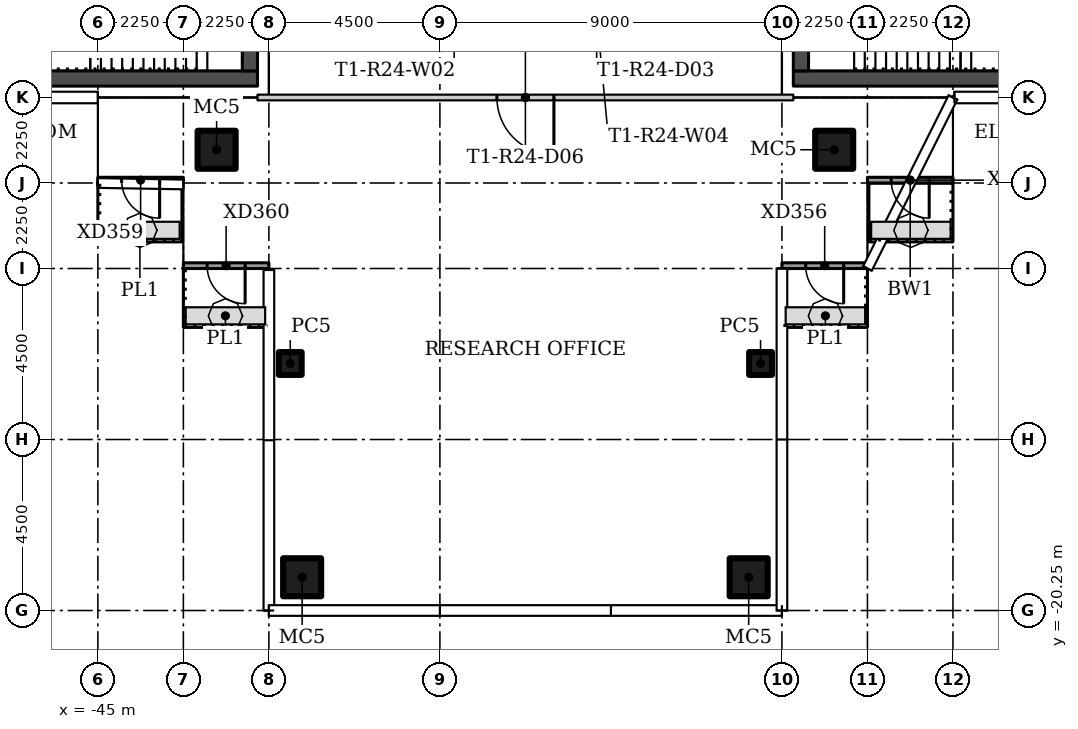
"""IFC4 building model, lengths in metres.
Left out: names, types, materials, properties, quantities, classifications, styles, units other than length and angle.
Written with IfcOpenShell. Run it as: python <this file> out.ifc"""

import sys

from ifc_helpers import new_model, si_unit, direction, frame, frame_2d, origin, origin_2d, place, context, subcontext, project, spatial, rectangle, hollow_rectangle, extrude, element, fill, save


model = new_model("IFC4")
c1 = context("Model", 3, precision=1e-05, world=origin(), true_north=direction((0.0, 1.0)))
c2 = subcontext(c1, "Body", "Model", "MODEL_VIEW")
j1 = project(units=[si_unit("LENGTHUNIT", "METRE"), si_unit("PLANEANGLEUNIT", "RADIAN")], contexts=[c1])
p1 = place(None, origin())
s1 = spatial("IfcSite", under=j1, at=p1, CompositionType="ELEMENT")
p2 = place(p1, origin())
s2 = spatial("IfcBuilding", under=s1, at=p2, CompositionType="ELEMENT")
p3 = place(p2, frame((0.0, 0.0, 221.7)))
s3 = spatial("IfcBuildingStorey", under=s2, at=p3, CompositionType="ELEMENT", Elevation=221.7)
for number, where in (
    (1, (-25.625, -8.125, 0.0)),
    (2, (-41.875, -8.125, 0.0)),
):
    element("IfcColumn", number, at=place(p3, frame(where)), inside=s3, PredefinedType="COLUMN", context=c2, shape_type="SweptSolid", body=[
        extrude(hollow_rectangle(XDim=1.0, YDim=1.0, WallThickness=0.04, at=origin_2d()), origin(), (0.0, 0.0, 1.0), 3.45),
    ])
p4 = place(p3, frame((-39.938, -13.75, 0.0)))
e3 = element("IfcColumn", 3, at=p4, inside=s3, PredefinedType="COLUMN", context=c2, shape_type="SweptSolid", body=[
    extrude(hollow_rectangle(XDim=0.6, YDim=0.6, WallThickness=0.02, at=origin_2d()), origin(), (0.0, 0.0, 1.0), 3.45),
])
p5 = place(p3, frame((-39.625, -19.375, 0.0)))
e4 = element("IfcColumn", 4, at=p5, inside=s3, PredefinedType="COLUMN", context=c2, shape_type="SweptSolid", body=[
    extrude(hollow_rectangle(XDim=1.0, YDim=1.0, WallThickness=0.04, at=origin_2d()), origin(), (0.0, 0.0, 1.0), 3.45),
])
p6 = place(p3, frame((-27.562, -13.75, 0.0)))
e5 = element("IfcColumn", 5, at=p6, inside=s3, PredefinedType="COLUMN", context=c2, shape_type="SweptSolid", body=[
    extrude(hollow_rectangle(XDim=0.6, YDim=0.6, WallThickness=0.02, at=origin_2d()), origin(), (0.0, 0.0, 1.0), 3.45),
])
p7 = place(p3, frame((-27.875, -19.375, 0.0)))
e6 = element("IfcColumn", 6, at=p7, inside=s3, PredefinedType="COLUMN", context=c2, shape_type="SweptSolid", body=[
    extrude(hollow_rectangle(XDim=1.0, YDim=1.0, WallThickness=0.04, at=origin_2d()), origin(), (0.0, 0.0, 1.0), 3.45),
])
p8 = place(p3, frame((-26.7, -6.75, 0.0), z_axis=(0.0, 0.0, 1.0), x_axis=(-1.0, 0.0, 0.0)))
e7 = element("IfcWall", 7, at=p8, inside=s3, PredefinedType="PARTITIONING", context=c2, shape_type="SweptSolid", body=[
    extrude(rectangle(XDim=14.1, YDim=0.15, at=frame_2d((7.05, 0.0))), origin(), (0.0, 0.0, 1.0), 3.45),
])
p9 = place(p8, frame((6.3, 0.0, 0.0)))
e8 = element("IfcOpeningElement", 8, at=p9, cuts=e7, PredefinedType="OPENING", context=c2, shape_type="SweptSolid", body=[
    extrude(rectangle(XDim=1.5, YDim=2.1, at=frame_2d((0.75, 1.05))), frame((0.0, 0.085, 0.0), z_axis=(0.0, -1.0, 0.0), x_axis=(1.0, 0.0, 0.0)), (0.0, 0.0, 1.0), 0.17),
])
p10 = place(p3, frame((-22.5, -8.925, 0.0), z_axis=(0.0, 0.0, 1.0), x_axis=(-1.0, 0.0, 0.0)))
e9 = element("IfcWall", 9, at=p10, inside=s3, PredefinedType="SOLIDWALL", context=c2, shape_type="SweptSolid", body=[
    extrude(rectangle(XDim=2.25, YDim=0.15, at=frame_2d((1.125, 0.0))), origin(), (0.0, 0.0, 1.0), 3.45),
])
p11 = place(p10, frame((0.625, 0.0, 0.0)))
e10 = element("IfcOpeningElement", 10, at=p11, cuts=e9, PredefinedType="OPENING", context=c2, shape_type="SweptSolid", body=[
    extrude(rectangle(XDim=1.0, YDim=2.4, at=frame_2d((0.5, 1.2))), frame((0.0, 0.085, 0.0), z_axis=(0.0, -1.0, 0.0), x_axis=(1.0, 0.0, 0.0)), (0.0, 0.0, 1.0), 0.17),
])
p12 = place(p3, frame((-24.75, -11.175, 0.0), z_axis=(0.0, 0.0, 1.0), x_axis=(-1.0, 0.0, 0.0)))
e11 = element("IfcWall", 11, at=p12, inside=s3, PredefinedType="SOLIDWALL", context=c2, shape_type="SweptSolid", body=[
    extrude(rectangle(XDim=2.25, YDim=0.15, at=frame_2d((1.125, 0.0))), origin(), (0.0, 0.0, 1.0), 3.45),
])
p13 = place(p12, frame((0.625, 0.0, 0.0)))
e12 = element("IfcOpeningElement", 12, at=p13, cuts=e11, PredefinedType="OPENING", context=c2, shape_type="SweptSolid", body=[
    extrude(rectangle(XDim=1.0, YDim=2.4, at=frame_2d((0.5, 1.2))), frame((0.0, 0.085, 0.0), z_axis=(0.0, -1.0, 0.0), x_axis=(1.0, 0.0, 0.0)), (0.0, 0.0, 1.0), 0.17),
])
p14 = place(p3, frame((-42.75, -8.925, 0.0), z_axis=(0.0, 0.0, 1.0), x_axis=(-1.0, 0.0, 0.0)))
e13 = element("IfcWall", 13, at=p14, inside=s3, PredefinedType="SOLIDWALL", context=c2, shape_type="SweptSolid", body=[
    extrude(rectangle(XDim=2.25, YDim=0.15, at=frame_2d((1.125, 0.0))), origin(), (0.0, 0.0, 1.0), 3.45),
])
p15 = place(p14, frame((0.625, 0.0, 0.0)))
e14 = element("IfcOpeningElement", 14, at=p15, cuts=e13, PredefinedType="OPENING", context=c2, shape_type="SweptSolid", body=[
    extrude(rectangle(XDim=1.0, YDim=2.4, at=frame_2d((0.5, 1.2))), frame((0.0, 0.085, 0.0), z_axis=(0.0, -1.0, 0.0), x_axis=(1.0, 0.0, 0.0)), (0.0, 0.0, 1.0), 0.17),
])
p16 = place(p3, frame((-40.5, -11.175, 0.0), z_axis=(0.0, 0.0, 1.0), x_axis=(-1.0, 0.0, 0.0)))
e15 = element("IfcWall", 15, at=p16, inside=s3, PredefinedType="SOLIDWALL", context=c2, shape_type="SweptSolid", body=[
    extrude(rectangle(XDim=2.25, YDim=0.15, at=frame_2d((1.125, 0.0))), origin(), (0.0, 0.0, 1.0), 3.45),
])
p17 = place(p16, frame((0.625, 0.0, 0.0)))
e16 = element("IfcOpeningElement", 16, at=p17, cuts=e15, PredefinedType="OPENING", context=c2, shape_type="SweptSolid", body=[
    extrude(rectangle(XDim=1.0, YDim=2.4, at=frame_2d((0.5, 1.2))), frame((0.0, 0.085, 0.0), z_axis=(0.0, -1.0, 0.0), x_axis=(1.0, 0.0, 0.0)), (0.0, 0.0, 1.0), 0.17),
])
p18 = place(p3, frame((-26.7, -6.25, 0.0)))
e17 = element("IfcWall", 17, at=p18, inside=s3, PredefinedType="SHEAR", context=c2, shape_type="SweptSolid", body=[
    extrude(rectangle(XDim=12.9, YDim=0.4, at=frame_2d((6.45, 0.0))), origin(), (0.0, 0.0, 1.0), 3.45),
])
p19 = place(p3, frame((-26.5, 6.05, 0.0), z_axis=(0.0, 0.0, 1.0), x_axis=(0.0, -1.0, 0.0)))
e18 = element("IfcWall", 18, at=p19, inside=s3, PredefinedType="SHEAR", context=c2, shape_type="SweptSolid", body=[
    extrude(rectangle(XDim=12.1, YDim=0.4, at=frame_2d((6.05, 0.0))), origin(), (0.0, 0.0, 1.0), 3.45),
])
p20 = place(p19, frame((3.9, 0.0, 0.0)))
e19 = element("IfcOpeningElement", 19, at=p20, cuts=e18, PredefinedType="OPENING", context=c2, shape_type="SweptSolid", body=[
    extrude(rectangle(XDim=1.8, YDim=2.4, at=frame_2d((0.9, 1.2))), frame((0.0, 0.21, 0.0), z_axis=(0.0, -1.0, 0.0), x_axis=(1.0, 0.0, 0.0)), (0.0, 0.0, 1.0), 0.42),
])
p21 = place(p3, frame((-40.8, -6.25, 0.0), z_axis=(0.0, 0.0, 1.0), x_axis=(-1.0, 0.0, 0.0)))
e20 = element("IfcWall", 20, at=p21, inside=s3, PredefinedType="SHEAR", context=c2, shape_type="SweptSolid", body=[
    extrude(rectangle(XDim=12.9, YDim=0.4, at=frame_2d((6.45, 0.0))), origin(), (0.0, 0.0, 1.0), 3.45),
])
p22 = place(p3, frame((-41.0, -6.05, 0.0), z_axis=(0.0, 0.0, 1.0), x_axis=(0.0, 1.0, 0.0)))
e21 = element("IfcWall", 21, at=p22, inside=s3, PredefinedType="SHEAR", context=c2, shape_type="SweptSolid", body=[
    extrude(rectangle(XDim=12.1, YDim=0.4, at=frame_2d((6.05, 0.0))), origin(), (0.0, 0.0, 1.0), 3.45),
])
p23 = place(p22, frame((6.4, 0.0, 0.0)))
e22 = element("IfcOpeningElement", 22, at=p23, cuts=e21, PredefinedType="OPENING", context=c2, shape_type="SweptSolid", body=[
    extrude(rectangle(XDim=1.8, YDim=2.4, at=frame_2d((0.9, 1.2))), frame((0.0, 0.21, 0.0), z_axis=(0.0, -1.0, 0.0), x_axis=(1.0, 0.0, 0.0)), (0.0, 0.0, 1.0), 0.42),
])
p24 = place(p9, origin())
e23 = element("IfcDoor", 23, at=p24, inside=s3, OperationType="DOUBLE_DOOR_SINGLE_SWING", PredefinedType="DOOR", context=c2, shape_type="SweptSolid", body=[
    extrude(rectangle(XDim=1.5, YDim=2.1, at=frame_2d((0.75, 1.05))), frame((0.0, 0.025, 0.0), z_axis=(0.0, -1.0, 0.0), x_axis=(1.0, 0.0, 0.0)), (0.0, 0.0, 1.0), 0.05),
])
fill(e8, e23)
p25 = place(p11, origin())
e24 = element("IfcDoor", 24, at=p25, inside=s3, OperationType="SINGLE_SWING_RIGHT", PredefinedType="DOOR", context=c2, shape_type="SweptSolid", body=[
    extrude(rectangle(XDim=1.0, YDim=2.4, at=frame_2d((0.5, 1.2))), frame((0.0, 0.025, 0.0), z_axis=(0.0, -1.0, 0.0), x_axis=(1.0, 0.0, 0.0)), (0.0, 0.0, 1.0), 0.05),
])
fill(e10, e24)
p26 = place(p13, origin())
e25 = element("IfcDoor", 25, at=p26, inside=s3, OperationType="SINGLE_SWING_LEFT", PredefinedType="DOOR", context=c2, shape_type="SweptSolid", body=[
    extrude(rectangle(XDim=1.0, YDim=2.4, at=frame_2d((0.5, 1.2))), frame((0.0, 0.025, 0.0), z_axis=(0.0, -1.0, 0.0), x_axis=(1.0, 0.0, 0.0)), (0.0, 0.0, 1.0), 0.05),
])
fill(e12, e25)
p27 = place(p15, origin())
e26 = element("IfcDoor", 26, at=p27, inside=s3, OperationType="SINGLE_SWING_LEFT", PredefinedType="DOOR", context=c2, shape_type="SweptSolid", body=[
    extrude(rectangle(XDim=1.0, YDim=2.4, at=frame_2d((0.5, 1.2))), frame((0.0, 0.025, 0.0), z_axis=(0.0, -1.0, 0.0), x_axis=(1.0, 0.0, 0.0)), (0.0, 0.0, 1.0), 0.05),
])
fill(e14, e26)
p28 = place(p17, origin())
e27 = element("IfcDoor", 27, at=p28, inside=s3, OperationType="SINGLE_SWING_RIGHT", PredefinedType="DOOR", context=c2, shape_type="SweptSolid", body=[
    extrude(rectangle(XDim=1.0, YDim=2.4, at=frame_2d((0.5, 1.2))), frame((0.0, 0.025, 0.0), z_axis=(0.0, -1.0, 0.0), x_axis=(1.0, 0.0, 0.0)), (0.0, 0.0, 1.0), 0.05),
])
fill(e16, e27)
save(model, sys.argv[1])
